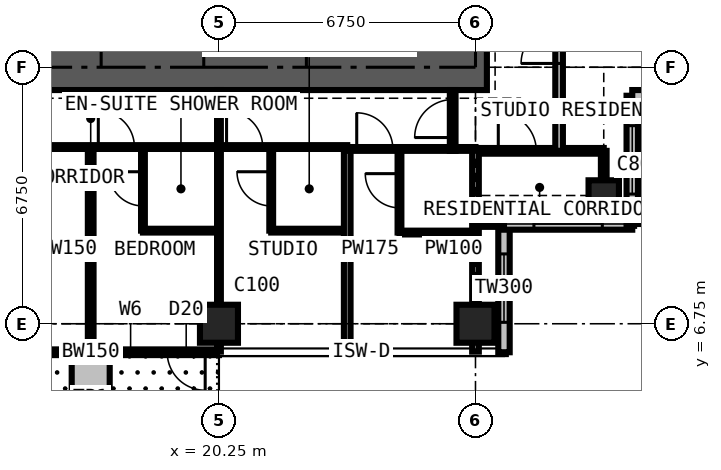
"""IFC4 building model, lengths in metres.
Left out: names, types, materials, properties, quantities, classifications, styles, units other than length and angle.
Written with IfcOpenShell. Run it as: python <this file> out.ifc"""

import sys

from ifc_helpers import new_model, si_unit, direction, frame, frame_2d, origin, origin_2d, place, context, subcontext, project, spatial, rectangle, extrude, element, fill, save


model = new_model("IFC4")
c1 = context("Model", 3, precision=1e-05, world=origin(), true_north=direction((0.0, 1.0)))
c2 = subcontext(c1, "Body", "Model", "MODEL_VIEW")
j1 = project(units=[si_unit("LENGTHUNIT", "METRE"), si_unit("PLANEANGLEUNIT", "RADIAN")], contexts=[c1])
p1 = place(None, origin())
s1 = spatial("IfcSite", under=j1, at=p1, CompositionType="ELEMENT")
p2 = place(p1, origin())
s2 = spatial("IfcBuilding", under=s1, at=p2, CompositionType="ELEMENT")
p3 = place(p2, frame((0.0, 0.0, 233.1)))
s3 = spatial("IfcBuildingStorey", under=s2, at=p3, CompositionType="ELEMENT", Elevation=233.1)
for number, where, z_axis, x_axis in (
    (1, (20.25, 6.75, 0.0), (0.0, 0.0, 1.0), (1.0, 0.0, 0.0)),
    (2, (27.0, 6.75, 0.0), (0.0, 0.0, 1.0), (1.0, 0.0, 0.0)),
):
    element("IfcColumn", number, at=place(p3, frame(where, z_axis=z_axis, x_axis=x_axis)), inside=s3, PredefinedType="COLUMN", context=c2, shape_type="SweptSolid", body=[
        extrude(rectangle(XDim=1.0, YDim=1.0, at=origin_2d()), origin(), (0.0, 0.0, 1.0), 3.6),
    ])
p4 = place(p3, frame((30.375, 10.125, 0.0), z_axis=(0.0, 0.0, 1.0), x_axis=(1.0, 0.0, 0.0)))
e3 = element("IfcColumn", 3, at=p4, inside=s3, PredefinedType="COLUMN", context=c2, shape_type="SweptSolid", body=[
    extrude(rectangle(XDim=0.8, YDim=0.8, at=origin_2d()), origin(), (0.0, 0.0, 1.0), 3.6),
])
p5 = place(p3, frame((13.2, 13.5, 0.0), z_axis=(0.0, 0.0, 1.0), x_axis=(1.0, 0.0, 0.0)))
e4 = element("IfcWall", 4, at=p5, inside=s3, PredefinedType="SHEAR", context=c2, shape_type="SweptSolid", body=[
    extrude(rectangle(XDim=14.1, YDim=1.2, at=frame_2d((7.05, 0.0))), origin(), (0.0, 0.0, 1.0), 3.6),
])
p6 = place(p3, frame((20.25, 6.0, 0.0), z_axis=(0.0, 0.0, 1.0), x_axis=(-1.0, 0.0, 0.0)))
e5 = element("IfcWall", 5, at=p6, inside=s3, PredefinedType="SOLIDWALL", context=c2, shape_type="SweptSolid", body=[
    extrude(rectangle(XDim=6.75, YDim=0.15, at=frame_2d((3.375, 0.0))), origin(), (0.0, 0.0, 1.0), 3.375),
])
p7 = place(p6, frame((0.363, 0.0, 0.0)))
e6 = element("IfcOpeningElement", 6, at=p7, cuts=e5, PredefinedType="OPENING", context=c2, shape_type="SweptSolid", body=[
    extrude(rectangle(XDim=1.0, YDim=2.2, at=frame_2d((0.5, 1.1))), frame((0.0, 0.085, 0.0), z_axis=(0.0, -1.0, 0.0), x_axis=(1.0, 0.0, 0.0)), (0.0, 0.0, 1.0), 0.17),
])
p8 = place(p6, frame((1.725, 0.0, 0.9)))
e7 = element("IfcOpeningElement", 7, at=p8, cuts=e5, PredefinedType="OPENING", context=c2, shape_type="SweptSolid", body=[
    extrude(rectangle(XDim=1.2, YDim=1.8, at=frame_2d((0.6, 0.9))), frame((0.0, 0.085, 0.0), z_axis=(0.0, -1.0, 0.0), x_axis=(1.0, 0.0, 0.0)), (0.0, 0.0, 1.0), 0.17),
])
p9 = place(p6, frame((5.387, 0.0, 0.0)))
e8 = element("IfcOpeningElement", 8, at=p9, cuts=e5, PredefinedType="OPENING", context=c2, shape_type="SweptSolid", body=[
    extrude(rectangle(XDim=1.0, YDim=2.2, at=frame_2d((0.5, 1.1))), frame((0.0, 0.085, 0.0), z_axis=(0.0, -1.0, 0.0), x_axis=(1.0, 0.0, 0.0)), (0.0, 0.0, 1.0), 0.17),
])
p10 = place(p6, frame((3.825, 0.0, 0.9)))
e9 = element("IfcOpeningElement", 9, at=p10, cuts=e5, PredefinedType="OPENING", context=c2, shape_type="SweptSolid", body=[
    extrude(rectangle(XDim=1.2, YDim=1.8, at=frame_2d((0.6, 0.9))), frame((0.0, 0.085, 0.0), z_axis=(0.0, -1.0, 0.0), x_axis=(1.0, 0.0, 0.0)), (0.0, 0.0, 1.0), 0.17),
])
p11 = place(p3, frame((27.75, 6.0, 0.0), z_axis=(0.0, 0.0, 1.0), x_axis=(0.0, 1.0, 0.0)))
e10 = element("IfcWall", 10, at=p11, inside=s3, PredefinedType="SOLIDWALL", context=c2, shape_type="SweptSolid", body=[
    extrude(rectangle(XDim=3.375, YDim=0.3, at=frame_2d((1.688, 0.0))), origin(), (0.0, 0.0, 1.0), 3.375),
])
p12 = place(p11, frame((0.788, 0.0, 0.6)))
e11 = element("IfcOpeningElement", 11, at=p12, cuts=e10, PredefinedType="OPENING", context=c2, shape_type="SweptSolid", body=[
    extrude(rectangle(XDim=1.8, YDim=2.1, at=frame_2d((0.9, 1.05))), frame((0.0, 0.16, 0.0), z_axis=(0.0, -1.0, 0.0), x_axis=(1.0, 0.0, 0.0)), (0.0, 0.0, 1.0), 0.32),
])
p13 = place(p3, frame((27.75, 9.375, 0.0), z_axis=(0.0, 0.0, 1.0), x_axis=(1.0, 0.0, 0.0)))
e12 = element("IfcWall", 12, at=p13, inside=s3, PredefinedType="SOLIDWALL", context=c2, shape_type="SweptSolid", body=[
    extrude(rectangle(XDim=3.375, YDim=0.3, at=frame_2d((1.688, 0.0))), origin(), (0.0, 0.0, 1.0), 3.375),
])
p14 = place(p13, frame((0.788, 0.0, 0.6)))
e13 = element("IfcOpeningElement", 13, at=p14, cuts=e12, PredefinedType="OPENING", context=c2, shape_type="SweptSolid", body=[
    extrude(rectangle(XDim=1.8, YDim=2.1, at=frame_2d((0.9, 1.05))), frame((0.0, 0.16, 0.0), z_axis=(0.0, -1.0, 0.0), x_axis=(1.0, 0.0, 0.0)), (0.0, 0.0, 1.0), 0.32),
])
p15 = place(p3, frame((31.125, 9.375, 0.0), z_axis=(0.0, 0.0, 1.0), x_axis=(0.0, 1.0, 0.0)))
e14 = element("IfcWall", 14, at=p15, inside=s3, PredefinedType="SOLIDWALL", context=c2, shape_type="SweptSolid", body=[
    extrude(rectangle(XDim=3.375, YDim=0.3, at=frame_2d((1.688, 0.0))), origin(), (0.0, 0.0, 1.0), 3.375),
])
p16 = place(p15, frame((0.788, 0.0, 0.6)))
e15 = element("IfcOpeningElement", 15, at=p16, cuts=e14, PredefinedType="OPENING", context=c2, shape_type="SweptSolid", body=[
    extrude(rectangle(XDim=1.8, YDim=2.1, at=frame_2d((0.9, 1.05))), frame((0.0, 0.16, 0.0), z_axis=(0.0, -1.0, 0.0), x_axis=(1.0, 0.0, 0.0)), (0.0, 0.0, 1.0), 0.32),
])
p17 = place(p3, frame((31.125, 12.75, 0.0), z_axis=(0.0, 0.0, 1.0), x_axis=(1.0, 0.0, 0.0)))
e16 = element("IfcWall", 16, at=p17, inside=s3, PredefinedType="SOLIDWALL", context=c2, shape_type="SweptSolid", body=[
    extrude(rectangle(XDim=3.375, YDim=0.3, at=frame_2d((1.688, 0.0))), origin(), (0.0, 0.0, 1.0), 3.375),
])
p18 = place(p17, frame((0.788, 0.0, 0.6)))
e17 = element("IfcOpeningElement", 17, at=p18, cuts=e16, PredefinedType="OPENING", context=c2, shape_type="SweptSolid", body=[
    extrude(rectangle(XDim=1.8, YDim=2.1, at=frame_2d((0.9, 1.05))), frame((0.0, 0.16, 0.0), z_axis=(0.0, -1.0, 0.0), x_axis=(1.0, 0.0, 0.0)), (0.0, 0.0, 1.0), 0.32),
])
p19 = place(p3, frame((16.875, 5.9, 0.0), z_axis=(0.0, 0.0, 1.0), x_axis=(0.0, -1.0, 0.0)))
e18 = element("IfcWall", 18, at=p19, inside=s3, PredefinedType="USERDEFINED", context=c2, shape_type="SweptSolid", body=[
    extrude(rectangle(XDim=2.2, YDim=1.0, at=frame_2d((1.1, 0.0))), origin(), (0.0, 0.0, 1.0), 0.9),
])
p20 = place(p3, frame((13.5, 11.4, 0.0), z_axis=(0.0, 0.0, 1.0), x_axis=(1.0, 0.0, 0.0)))
e19 = element("IfcWall", 19, at=p20, inside=s3, PredefinedType="PARTITIONING", context=c2, shape_type="SweptSolid", body=[
    extrude(rectangle(XDim=10.125, YDim=0.1, at=frame_2d((5.062, 0.0))), origin(), (0.0, 0.0, 1.0), 3.375),
])
p21 = place(p20, frame((1.2, 0.0, 0.0)))
e20 = element("IfcOpeningElement", 20, at=p21, cuts=e19, PredefinedType="OPENING", context=c2, shape_type="SweptSolid", body=[
    extrude(rectangle(XDim=1.0, YDim=2.2, at=frame_2d((0.5, 1.1))), frame((0.0, 0.06, 0.0), z_axis=(0.0, -1.0, 0.0), x_axis=(1.0, 0.0, 0.0)), (0.0, 0.0, 1.0), 0.12),
])
p22 = place(p20, frame((3.575, 0.0, 0.0)))
e21 = element("IfcOpeningElement", 21, at=p22, cuts=e19, PredefinedType="OPENING", context=c2, shape_type="SweptSolid", body=[
    extrude(rectangle(XDim=0.95, YDim=2.2, at=frame_2d((0.475, 1.1))), frame((0.0, 0.06, 0.0), z_axis=(0.0, -1.0, 0.0), x_axis=(1.0, 0.0, 0.0)), (0.0, 0.0, 1.0), 0.12),
])
p23 = place(p20, frame((6.95, 0.0, 0.0)))
e22 = element("IfcOpeningElement", 22, at=p23, cuts=e19, PredefinedType="OPENING", context=c2, shape_type="SweptSolid", body=[
    extrude(rectangle(XDim=0.95, YDim=2.2, at=frame_2d((0.475, 1.1))), frame((0.0, 0.06, 0.0), z_axis=(0.0, -1.0, 0.0), x_axis=(1.0, 0.0, 0.0)), (0.0, 0.0, 1.0), 0.12),
])
p24 = place(p3, frame((16.875, 6.016, 0.0), z_axis=(0.0, 0.0, 1.0), x_axis=(0.0, 1.0, 0.0)))
e23 = element("IfcWall", 23, at=p24, inside=s3, PredefinedType="PARTITIONING", context=c2, shape_type="SweptSolid", body=[
    extrude(rectangle(XDim=5.384, YDim=0.15, at=frame_2d((2.692, 0.0))), origin(), (0.0, 0.0, 1.0), 3.375),
])
p25 = place(p3, frame((18.25, 9.2, 0.0), z_axis=(0.0, 0.0, 1.0), x_axis=(0.0, 1.0, 0.0)))
e24 = element("IfcWall", 24, at=p25, inside=s3, PredefinedType="PARTITIONING", context=c2, shape_type="SweptSolid", body=[
    extrude(rectangle(XDim=2.2, YDim=0.1, at=frame_2d((1.1, 0.0))), origin(), (0.0, 0.0, 1.0), 3.375),
])
p26 = place(p25, frame((0.65, 0.0, 0.0)))
e25 = element("IfcOpeningElement", 25, at=p26, cuts=e24, PredefinedType="OPENING", context=c2, shape_type="SweptSolid", body=[
    extrude(rectangle(XDim=0.9, YDim=2.2, at=frame_2d((0.45, 1.1))), frame((0.0, 0.06, 0.0), z_axis=(0.0, -1.0, 0.0), x_axis=(1.0, 0.0, 0.0)), (0.0, 0.0, 1.0), 0.12),
])
p27 = place(p3, frame((18.25, 9.2, 0.0), z_axis=(0.0, 0.0, 1.0), x_axis=(1.0, 0.0, 0.0)))
e26 = element("IfcWall", 26, at=p27, inside=s3, PredefinedType="PARTITIONING", context=c2, shape_type="SweptSolid", body=[
    extrude(rectangle(XDim=2.0, YDim=0.1, at=frame_2d((1.0, 0.0))), origin(), (0.0, 0.0, 1.0), 3.375),
])
p28 = place(p3, frame((20.25, 6.016, 0.0), z_axis=(0.0, 0.0, 1.0), x_axis=(0.0, 1.0, 0.0)))
e27 = element("IfcWall", 27, at=p28, inside=s3, PredefinedType="PARTITIONING", context=c2, shape_type="SweptSolid", body=[
    extrude(rectangle(XDim=6.884, YDim=0.1, at=frame_2d((3.442, 0.0))), origin(), (0.0, 0.0, 1.0), 2.877),
])
p29 = place(p3, frame((21.625, 9.2, 0.0), z_axis=(0.0, 0.0, 1.0), x_axis=(0.0, 1.0, 0.0)))
e28 = element("IfcWall", 28, at=p29, inside=s3, PredefinedType="PARTITIONING", context=c2, shape_type="SweptSolid", body=[
    extrude(rectangle(XDim=2.2, YDim=0.1, at=frame_2d((1.1, 0.0))), origin(), (0.0, 0.0, 1.0), 3.375),
])
p30 = place(p29, frame((0.65, 0.0, 0.0)))
e29 = element("IfcOpeningElement", 29, at=p30, cuts=e28, PredefinedType="OPENING", context=c2, shape_type="SweptSolid", body=[
    extrude(rectangle(XDim=0.9, YDim=2.2, at=frame_2d((0.45, 1.1))), frame((0.0, 0.06, 0.0), z_axis=(0.0, -1.0, 0.0), x_axis=(1.0, 0.0, 0.0)), (0.0, 0.0, 1.0), 0.12),
])
p31 = place(p3, frame((21.625, 9.2, 0.0), z_axis=(0.0, 0.0, 1.0), x_axis=(1.0, 0.0, 0.0)))
e30 = element("IfcWall", 30, at=p31, inside=s3, PredefinedType="PARTITIONING", context=c2, shape_type="SweptSolid", body=[
    extrude(rectangle(XDim=2.0, YDim=0.1, at=frame_2d((1.0, 0.0))), origin(), (0.0, 0.0, 1.0), 3.375),
])
p32 = place(p3, frame((23.625, 6.016, 0.0), z_axis=(0.0, 0.0, 1.0), x_axis=(0.0, 1.0, 0.0)))
e31 = element("IfcWall", 31, at=p32, inside=s3, PredefinedType="PARTITIONING", context=c2, shape_type="SweptSolid", body=[
    extrude(rectangle(XDim=5.384, YDim=0.175, at=frame_2d((2.692, 0.0))), origin(), (0.0, 0.0, 1.0), 3.375),
])
p33 = place(p3, frame((23.625, 11.35, 0.0), z_axis=(0.0, 0.0, 1.0), x_axis=(1.0, 0.0, 0.0)))
e32 = element("IfcWall", 32, at=p33, inside=s3, PredefinedType="PARTITIONING", context=c2, shape_type="SweptSolid", body=[
    extrude(rectangle(XDim=3.375, YDim=0.1, at=frame_2d((1.688, 0.0))), origin(), (0.0, 0.0, 1.0), 3.375),
])
p34 = place(p33, frame((0.25, 0.0, 0.0)))
e33 = element("IfcOpeningElement", 33, at=p34, cuts=e32, PredefinedType="OPENING", context=c2, shape_type="SweptSolid", body=[
    extrude(rectangle(XDim=0.95, YDim=2.2, at=frame_2d((0.475, 1.1))), frame((0.0, 0.06, 0.0), z_axis=(0.0, -1.0, 0.0), x_axis=(1.0, 0.0, 0.0)), (0.0, 0.0, 1.0), 0.12),
])
p35 = place(p3, frame((25.0, 9.15, 0.0), z_axis=(0.0, 0.0, 1.0), x_axis=(0.0, 1.0, 0.0)))
e34 = element("IfcWall", 34, at=p35, inside=s3, PredefinedType="PARTITIONING", context=c2, shape_type="SweptSolid", body=[
    extrude(rectangle(XDim=2.2, YDim=0.1, at=frame_2d((1.1, 0.0))), origin(), (0.0, 0.0, 1.0), 3.375),
])
p36 = place(p35, frame((0.65, 0.0, 0.0)))
e35 = element("IfcOpeningElement", 35, at=p36, cuts=e34, PredefinedType="OPENING", context=c2, shape_type="SweptSolid", body=[
    extrude(rectangle(XDim=0.9, YDim=2.2, at=frame_2d((0.45, 1.1))), frame((0.0, 0.06, 0.0), z_axis=(0.0, -1.0, 0.0), x_axis=(1.0, 0.0, 0.0)), (0.0, 0.0, 1.0), 0.12),
])
p37 = place(p3, frame((25.0, 9.15, 0.0), z_axis=(0.0, 0.0, 1.0), x_axis=(1.0, 0.0, 0.0)))
e36 = element("IfcWall", 36, at=p37, inside=s3, PredefinedType="PARTITIONING", context=c2, shape_type="SweptSolid", body=[
    extrude(rectangle(XDim=2.0, YDim=0.1, at=frame_2d((1.0, 0.0))), origin(), (0.0, 0.0, 1.0), 3.375),
])
p38 = place(p3, frame((26.4, 11.3, 0.0), z_axis=(0.0, 0.0, 1.0), x_axis=(0.0, 1.0, 0.0)))
e37 = element("IfcWall", 37, at=p38, inside=s3, PredefinedType="PARTITIONING", context=c2, shape_type="SweptSolid", body=[
    extrude(rectangle(XDim=1.6, YDim=0.15, at=frame_2d((0.8, 0.0))), origin(), (0.0, 0.0, 1.0), 3.375),
])
p39 = place(p38, frame((0.35, 0.0, 0.0)))
e38 = element("IfcOpeningElement", 38, at=p39, cuts=e37, PredefinedType="OPENING", context=c2, shape_type="SweptSolid", body=[
    extrude(rectangle(XDim=1.0, YDim=2.2, at=frame_2d((0.5, 1.1))), frame((0.0, 0.085, 0.0), z_axis=(0.0, -1.0, 0.0), x_axis=(1.0, 0.0, 0.0)), (0.0, 0.0, 1.0), 0.17),
])
p40 = place(p3, frame((27.0, 11.3, 0.0), z_axis=(0.0, 0.0, 1.0), x_axis=(1.0, 0.0, 0.0)))
e39 = element("IfcWall", 39, at=p40, inside=s3, PredefinedType="PARTITIONING", context=c2, shape_type="SweptSolid", body=[
    extrude(rectangle(XDim=3.375, YDim=0.15, at=frame_2d((1.688, 0.0))), origin(), (0.0, 0.0, 1.0), 3.375),
])
p41 = place(p40, frame((0.6, 0.0, 0.0)))
e40 = element("IfcOpeningElement", 40, at=p41, cuts=e39, PredefinedType="OPENING", context=c2, shape_type="SweptSolid", body=[
    extrude(rectangle(XDim=1.0, YDim=2.2, at=frame_2d((0.5, 1.1))), frame((0.0, 0.085, 0.0), z_axis=(0.0, -1.0, 0.0), x_axis=(1.0, 0.0, 0.0)), (0.0, 0.0, 1.0), 0.17),
])
p42 = place(p3, frame((27.0, 6.016, 0.0), z_axis=(0.0, 0.0, 1.0), x_axis=(0.0, 1.0, 0.0)))
e41 = element("IfcWall", 41, at=p42, inside=s3, PredefinedType="PARTITIONING", context=c2, shape_type="SweptSolid", body=[
    extrude(rectangle(XDim=5.334, YDim=0.175, at=frame_2d((2.667, 0.0))), origin(), (0.0, 0.0, 1.0), 2.877),
])
p43 = place(p3, frame((27.0, 9.375, 0.0), z_axis=(0.0, 0.0, 1.0), x_axis=(1.0, 0.0, 0.0)))
e42 = element("IfcWall", 42, at=p43, inside=s3, PredefinedType="PARTITIONING", context=c2, shape_type="SweptSolid", body=[
    extrude(rectangle(XDim=0.734, YDim=0.15, at=frame_2d((0.367, 0.0))), origin(), (0.0, 0.0, 1.0), 3.375),
])
p44 = place(p3, frame((29.2, 11.3, 0.0), z_axis=(0.0, 0.0, 1.0), x_axis=(0.0, 1.0, 0.0)))
e43 = element("IfcWall", 43, at=p44, inside=s3, PredefinedType="PARTITIONING", context=c2, shape_type="SweptSolid", body=[
    extrude(rectangle(XDim=17.9, YDim=0.2, at=frame_2d((8.95, 0.0))), origin(), (0.0, 0.0, 1.0), 3.375),
])
p45 = place(p44, frame((2.3, 0.0, 0.0)))
e44 = element("IfcOpeningElement", 44, at=p45, cuts=e43, PredefinedType="OPENING", context=c2, shape_type="SweptSolid", body=[
    extrude(rectangle(XDim=1.0, YDim=2.2, at=frame_2d((0.5, 1.1))), frame((0.0, 0.11, 0.0), z_axis=(0.0, -1.0, 0.0), x_axis=(1.0, 0.0, 0.0)), (0.0, 0.0, 1.0), 0.22),
])
p46 = place(p44, frame((5.775, 0.0, 0.0)))
e45 = element("IfcOpeningElement", 45, at=p46, cuts=e43, PredefinedType="OPENING", context=c2, shape_type="SweptSolid", body=[
    extrude(rectangle(XDim=0.95, YDim=2.2, at=frame_2d((0.475, 1.1))), frame((0.0, 0.11, 0.0), z_axis=(0.0, -1.0, 0.0), x_axis=(1.0, 0.0, 0.0)), (0.0, 0.0, 1.0), 0.22),
])
p47 = place(p44, frame((9.2, 0.0, 0.0)))
e46 = element("IfcOpeningElement", 46, at=p47, cuts=e43, PredefinedType="OPENING", context=c2, shape_type="SweptSolid", body=[
    extrude(rectangle(XDim=0.95, YDim=2.2, at=frame_2d((0.475, 1.1))), frame((0.0, 0.11, 0.0), z_axis=(0.0, -1.0, 0.0), x_axis=(1.0, 0.0, 0.0)), (0.0, 0.0, 1.0), 0.22),
])
p48 = place(p44, frame((12.575, 0.0, 0.0)))
e47 = element("IfcOpeningElement", 47, at=p48, cuts=e43, PredefinedType="OPENING", context=c2, shape_type="SweptSolid", body=[
    extrude(rectangle(XDim=0.95, YDim=2.2, at=frame_2d((0.475, 1.1))), frame((0.0, 0.11, 0.0), z_axis=(0.0, -1.0, 0.0), x_axis=(1.0, 0.0, 0.0)), (0.0, 0.0, 1.0), 0.22),
])
p49 = place(p44, frame((16.3, 0.0, 0.0)))
e48 = element("IfcOpeningElement", 48, at=p49, cuts=e43, PredefinedType="OPENING", context=c2, shape_type="SweptSolid", body=[
    extrude(rectangle(XDim=1.0, YDim=2.2, at=frame_2d((0.5, 1.1))), frame((0.0, 0.11, 0.0), z_axis=(0.0, -1.0, 0.0), x_axis=(1.0, 0.0, 0.0)), (0.0, 0.0, 1.0), 0.22),
])
p50 = place(p3, frame((30.375, 9.525, 0.0), z_axis=(0.0, 0.0, 1.0), x_axis=(0.0, 1.0, 0.0)))
e49 = element("IfcWall", 49, at=p50, inside=s3, PredefinedType="PARTITIONING", context=c2, shape_type="SweptSolid", body=[
    extrude(rectangle(XDim=1.775, YDim=0.15, at=frame_2d((0.888, 0.0))), origin(), (0.0, 0.0, 1.0), 2.877),
])
p51 = place(p7, origin())
e50 = element("IfcDoor", 50, at=p51, inside=s3, OperationType="SINGLE_SWING_LEFT", PredefinedType="DOOR", context=c2, shape_type="SweptSolid", body=[
    extrude(rectangle(XDim=1.0, YDim=2.2, at=frame_2d((0.5, 1.1))), frame((0.0, 0.025, 0.0), z_axis=(0.0, -1.0, 0.0), x_axis=(1.0, 0.0, 0.0)), (0.0, 0.0, 1.0), 0.05),
])
fill(e6, e50)
p52 = place(p8, origin())
e51 = element("IfcWindow", 51, at=p52, inside=s3, PartitioningType="SINGLE_PANEL", PredefinedType="WINDOW", context=c2, shape_type="SweptSolid", body=[
    extrude(rectangle(XDim=1.2, YDim=1.8, at=frame_2d((0.6, 0.9))), frame((0.0, 0.03, 0.0), z_axis=(0.0, -1.0, 0.0), x_axis=(1.0, 0.0, 0.0)), (0.0, 0.0, 1.0), 0.06),
])
fill(e7, e51)
p53 = place(p10, origin())
e52 = element("IfcWindow", 52, at=p53, inside=s3, PartitioningType="SINGLE_PANEL", PredefinedType="WINDOW", context=c2, shape_type="SweptSolid", body=[
    extrude(rectangle(XDim=1.2, YDim=1.8, at=frame_2d((0.6, 0.9))), frame((0.0, 0.03, 0.0), z_axis=(0.0, -1.0, 0.0), x_axis=(1.0, 0.0, 0.0)), (0.0, 0.0, 1.0), 0.06),
])
fill(e9, e52)
p54 = place(p12, origin())
e53 = element("IfcWindow", 53, at=p54, inside=s3, PartitioningType="SINGLE_PANEL", PredefinedType="WINDOW", context=c2, shape_type="SweptSolid", body=[
    extrude(rectangle(XDim=1.8, YDim=2.1, at=frame_2d((0.9, 1.05))), frame((0.0, 0.03, 0.0), z_axis=(0.0, -1.0, 0.0), x_axis=(1.0, 0.0, 0.0)), (0.0, 0.0, 1.0), 0.06),
])
fill(e11, e53)
p55 = place(p14, origin())
e54 = element("IfcWindow", 54, at=p55, inside=s3, PartitioningType="SINGLE_PANEL", PredefinedType="WINDOW", context=c2, shape_type="SweptSolid", body=[
    extrude(rectangle(XDim=1.8, YDim=2.1, at=frame_2d((0.9, 1.05))), frame((0.0, 0.03, 0.0), z_axis=(0.0, -1.0, 0.0), x_axis=(1.0, 0.0, 0.0)), (0.0, 0.0, 1.0), 0.06),
])
fill(e13, e54)
p56 = place(p16, origin())
e55 = element("IfcWindow", 55, at=p56, inside=s3, PartitioningType="SINGLE_PANEL", PredefinedType="WINDOW", context=c2, shape_type="SweptSolid", body=[
    extrude(rectangle(XDim=1.8, YDim=2.1, at=frame_2d((0.9, 1.05))), frame((0.0, 0.03, 0.0), z_axis=(0.0, -1.0, 0.0), x_axis=(1.0, 0.0, 0.0)), (0.0, 0.0, 1.0), 0.06),
])
fill(e15, e55)
p57 = place(p22, origin())
e56 = element("IfcDoor", 56, at=p57, inside=s3, OperationType="SINGLE_SWING_LEFT", PredefinedType="DOOR", context=c2, shape_type="SweptSolid", body=[
    extrude(rectangle(XDim=0.95, YDim=2.2, at=frame_2d((0.475, 1.1))), frame((0.0, 0.025, 0.0), z_axis=(0.0, -1.0, 0.0), x_axis=(1.0, 0.0, 0.0)), (0.0, 0.0, 1.0), 0.05),
])
fill(e21, e56)
p58 = place(p26, origin())
e57 = element("IfcDoor", 57, at=p58, inside=s3, OperationType="SINGLE_SWING_RIGHT", PredefinedType="DOOR", context=c2, shape_type="SweptSolid", body=[
    extrude(rectangle(XDim=0.9, YDim=2.2, at=frame_2d((0.45, 1.1))), frame((0.0, 0.025, 0.0), z_axis=(0.0, -1.0, 0.0), x_axis=(1.0, 0.0, 0.0)), (0.0, 0.0, 1.0), 0.05),
])
fill(e25, e57)
p59 = place(p23, origin())
e58 = element("IfcDoor", 58, at=p59, inside=s3, OperationType="SINGLE_SWING_LEFT", PredefinedType="DOOR", context=c2, shape_type="SweptSolid", body=[
    extrude(rectangle(XDim=0.95, YDim=2.2, at=frame_2d((0.475, 1.1))), frame((0.0, 0.025, 0.0), z_axis=(0.0, -1.0, 0.0), x_axis=(1.0, 0.0, 0.0)), (0.0, 0.0, 1.0), 0.05),
])
fill(e22, e58)
p60 = place(p30, origin())
e59 = element("IfcDoor", 59, at=p60, inside=s3, OperationType="SINGLE_SWING_RIGHT", PredefinedType="DOOR", context=c2, shape_type="SweptSolid", body=[
    extrude(rectangle(XDim=0.9, YDim=2.2, at=frame_2d((0.45, 1.1))), frame((0.0, 0.025, 0.0), z_axis=(0.0, -1.0, 0.0), x_axis=(1.0, 0.0, 0.0)), (0.0, 0.0, 1.0), 0.05),
])
fill(e29, e59)
p61 = place(p34, origin())
e60 = element("IfcDoor", 60, at=p61, inside=s3, OperationType="SINGLE_SWING_LEFT", PredefinedType="DOOR", context=c2, shape_type="SweptSolid", body=[
    extrude(rectangle(XDim=0.95, YDim=2.2, at=frame_2d((0.475, 1.1))), frame((0.0, 0.025, 0.0), z_axis=(0.0, -1.0, 0.0), x_axis=(1.0, 0.0, 0.0)), (0.0, 0.0, 1.0), 0.05),
])
fill(e33, e60)
p62 = place(p36, origin())
e61 = element("IfcDoor", 61, at=p62, inside=s3, OperationType="SINGLE_SWING_RIGHT", PredefinedType="DOOR", context=c2, shape_type="SweptSolid", body=[
    extrude(rectangle(XDim=0.9, YDim=2.2, at=frame_2d((0.45, 1.1))), frame((0.0, 0.025, 0.0), z_axis=(0.0, -1.0, 0.0), x_axis=(1.0, 0.0, 0.0)), (0.0, 0.0, 1.0), 0.05),
])
fill(e35, e61)
p63 = place(p41, origin())
e62 = element("IfcDoor", 62, at=p63, inside=s3, OperationType="SINGLE_SWING_LEFT", PredefinedType="DOOR", context=c2, shape_type="SweptSolid", body=[
    extrude(rectangle(XDim=1.0, YDim=2.2, at=frame_2d((0.5, 1.1))), frame((0.0, 0.025, 0.0), z_axis=(0.0, -1.0, 0.0), x_axis=(1.0, 0.0, 0.0)), (0.0, 0.0, 1.0), 0.05),
])
fill(e40, e62)
p64 = place(p39, origin())
e63 = element("IfcDoor", 63, at=p64, inside=s3, OperationType="SINGLE_SWING_LEFT", PredefinedType="DOOR", context=c2, shape_type="SweptSolid", body=[
    extrude(rectangle(XDim=1.0, YDim=2.2, at=frame_2d((0.5, 1.1))), frame((0.0, 0.025, 0.0), z_axis=(0.0, -1.0, 0.0), x_axis=(1.0, 0.0, 0.0)), (0.0, 0.0, 1.0), 0.05),
])
fill(e38, e63)
p65 = place(p45, origin())
e64 = element("IfcDoor", 64, at=p65, inside=s3, OperationType="SINGLE_SWING_LEFT", PredefinedType="DOOR", context=c2, shape_type="SweptSolid", body=[
    extrude(rectangle(XDim=1.0, YDim=2.2, at=frame_2d((0.5, 1.1))), frame((0.0, 0.025, 0.0), z_axis=(0.0, -1.0, 0.0), x_axis=(1.0, 0.0, 0.0)), (0.0, 0.0, 1.0), 0.05),
])
fill(e44, e64)
save(model, sys.argv[1])
